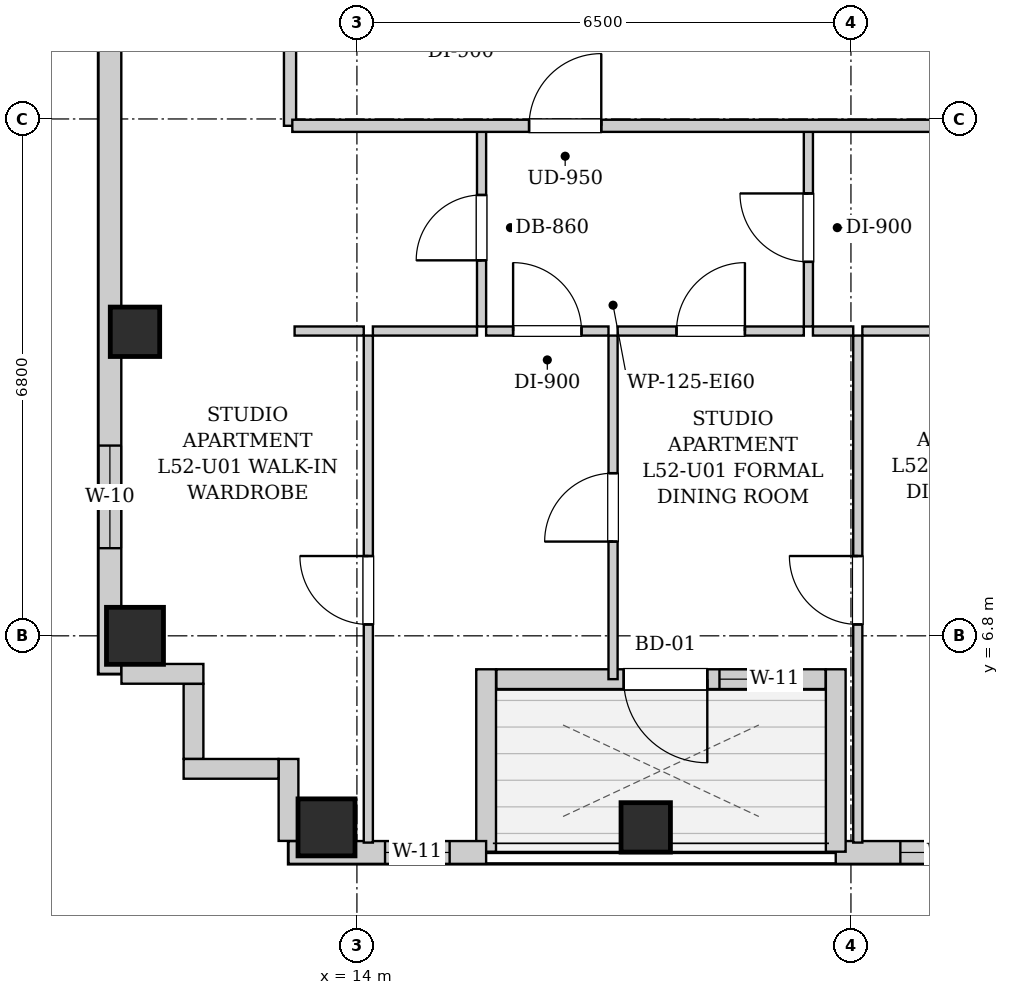
"""IFC4 building model, lengths in metres.
Left out: names, types, materials, properties, quantities, classifications, styles, units other than length and angle.
Written with IfcOpenShell. Run it as: python <this file> out.ifc"""

import sys

from ifc_helpers import new_model, si_unit, direction, frame, frame_2d, origin, origin_2d, place, context, subcontext, project, spatial, rectangle, extrude, element, fill, save


model = new_model("IFC4")
c1 = context("Model", 3, precision=1e-05, world=origin(), true_north=direction((0.0, 1.0)))
c2 = subcontext(c1, "Body", "Model", "MODEL_VIEW")
j1 = project(units=[si_unit("LENGTHUNIT", "METRE"), si_unit("PLANEANGLEUNIT", "RADIAN")], contexts=[c1])
p1 = place(None, origin())
s1 = spatial("IfcSite", under=j1, at=p1, CompositionType="ELEMENT")
p2 = place(p1, origin())
s2 = spatial("IfcBuilding", under=s1, at=p2, CompositionType="ELEMENT")
p3 = place(p2, frame((0.0, 0.0, 181.0)))
s3 = spatial("IfcBuildingStorey", under=s2, at=p3, CompositionType="ELEMENT", Elevation=181.0)
p4 = place(p3, frame((13.6, 4.28, 0.0), z_axis=(0.0, 0.0, 1.0), x_axis=(1.0, 0.0, 0.0)))
e1 = element("IfcColumn", 1, at=p4, inside=s3, PredefinedType="COLUMN", context=c2, shape_type="SweptSolid", body=[
    extrude(rectangle(XDim=0.75, YDim=0.75, at=origin_2d()), origin(), (0.0, 0.0, 1.0), 3.3),
])
p5 = place(p3, frame((17.8, 4.28, 0.0), z_axis=(0.0, 0.0, 1.0), x_axis=(1.0, 0.0, 0.0)))
e2 = element("IfcColumn", 2, at=p5, inside=s3, PredefinedType="COLUMN", context=c2, shape_type="SweptSolid", body=[
    extrude(rectangle(XDim=0.65, YDim=0.65, at=origin_2d()), origin(), (0.0, 0.0, 1.0), 3.3),
])
p6 = place(p3, frame((11.08, 6.8, 0.0), z_axis=(0.0, 0.0, 1.0), x_axis=(1.0, 0.0, 0.0)))
e3 = element("IfcColumn", 3, at=p6, inside=s3, PredefinedType="COLUMN", context=c2, shape_type="SweptSolid", body=[
    extrude(rectangle(XDim=0.75, YDim=0.75, at=origin_2d()), origin(), (0.0, 0.0, 1.0), 3.3),
])
p7 = place(p3, frame((11.08, 10.8, 0.0), z_axis=(0.0, 0.0, 1.0), x_axis=(1.0, 0.0, 0.0)))
e4 = element("IfcColumn", 4, at=p7, inside=s3, PredefinedType="COLUMN", context=c2, shape_type="SweptSolid", body=[
    extrude(rectangle(XDim=0.65, YDim=0.65, at=origin_2d()), origin(), (0.0, 0.0, 1.0), 3.3),
])
p8 = place(p3, frame((31.5, 3.95, 0.0), z_axis=(0.0, 0.0, 1.0), x_axis=(-1.0, 0.0, 0.0)))
e5 = element("IfcWall", 5, at=p8, inside=s3, PredefinedType="SOLIDWALL", context=c2, shape_type="SweptSolid", body=[
    extrude(rectangle(XDim=11.2, YDim=0.3, at=frame_2d((5.6, 0.0))), origin(), (0.0, 0.0, 1.0), 3.04),
])
p9 = place(p8, frame((9.0, 0.0, 0.55)))
e6 = element("IfcOpeningElement", 6, at=p9, cuts=e5, PredefinedType="OPENING", context=c2, shape_type="SweptSolid", body=[
    extrude(rectangle(XDim=1.35, YDim=1.2, at=frame_2d((0.675, 0.6))), frame((0.0, 0.16, 0.0), z_axis=(0.0, -1.0, 0.0), x_axis=(1.0, 0.0, 0.0)), (0.0, 0.0, 1.0), 0.32),
])
p10 = place(p8, frame((2.201, 0.0, 0.55)))
e7 = element("IfcOpeningElement", 7, at=p10, cuts=e5, PredefinedType="OPENING", context=c2, shape_type="SweptSolid", body=[
    extrude(rectangle(XDim=1.35, YDim=1.2, at=frame_2d((0.675, 0.6))), frame((0.0, 0.16, 0.0), z_axis=(0.0, -1.0, 0.0), x_axis=(1.0, 0.0, 0.0)), (0.0, 0.0, 1.0), 0.32),
])
p11 = place(p8, frame((0.35, 0.0, 0.55)))
e8 = element("IfcOpeningElement", 8, at=p11, cuts=e5, PredefinedType="OPENING", context=c2, shape_type="SweptSolid", body=[
    extrude(rectangle(XDim=0.68, YDim=1.2, at=frame_2d((0.34, 0.6))), frame((0.0, 0.16, 0.0), z_axis=(0.0, -1.0, 0.0), x_axis=(1.0, 0.0, 0.0)), (0.0, 0.0, 1.0), 0.32),
])
p12 = place(p3, frame((20.3, 3.96, 0.0), z_axis=(0.0, 0.0, 1.0), x_axis=(0.0, 1.0, 0.0)))
e9 = element("IfcWall", 9, at=p12, inside=s3, PredefinedType="SOLIDWALL", context=c2, shape_type="SweptSolid", body=[
    extrude(rectangle(XDim=2.4, YDim=0.26, at=frame_2d((1.2, 0.0))), origin(), (0.0, 0.0, 1.0), 3.04),
])
p13 = place(p3, frame((20.166, 6.23, 0.0), z_axis=(0.0, 0.0, 1.0), x_axis=(-1.0, 0.0, 0.0)))
e10 = element("IfcWall", 10, at=p13, inside=s3, PredefinedType="SOLIDWALL", context=c2, shape_type="SweptSolid", body=[
    extrude(rectangle(XDim=4.332, YDim=0.26, at=frame_2d((2.166, 0.0))), origin(), (0.0, 0.0, 1.0), 3.04),
])
p14 = place(p13, frame((1.556, 0.0, 0.0)))
e11 = element("IfcOpeningElement", 11, at=p14, cuts=e10, PredefinedType="OPENING", context=c2, shape_type="SweptSolid", body=[
    extrude(rectangle(XDim=1.1, YDim=2.0, at=frame_2d((0.55, 1.0))), frame((0.0, 0.14, 0.0), z_axis=(0.0, -1.0, 0.0), x_axis=(1.0, 0.0, 0.0)), (0.0, 0.0, 1.0), 0.28),
])
p15 = place(p13, frame((0.546, 0.0, 0.55)))
e12 = element("IfcOpeningElement", 12, at=p15, cuts=e10, PredefinedType="OPENING", context=c2, shape_type="SweptSolid", body=[
    extrude(rectangle(XDim=0.85, YDim=1.2, at=frame_2d((0.425, 0.6))), frame((0.0, 0.14, 0.0), z_axis=(0.0, -1.0, 0.0), x_axis=(1.0, 0.0, 0.0)), (0.0, 0.0, 1.0), 0.28),
])
p16 = place(p3, frame((15.7, 6.36, 0.0), z_axis=(0.0, 0.0, 1.0), x_axis=(0.0, -1.0, 0.0)))
e13 = element("IfcWall", 13, at=p16, inside=s3, PredefinedType="SOLIDWALL", context=c2, shape_type="SweptSolid", body=[
    extrude(rectangle(XDim=2.4, YDim=0.26, at=frame_2d((1.2, 0.0))), origin(), (0.0, 0.0, 1.0), 3.04),
])
p17 = place(p3, frame((15.7, 3.95, 0.0), z_axis=(0.0, 0.0, 1.0), x_axis=(-1.0, 0.0, 0.0)))
e14 = element("IfcWall", 14, at=p17, inside=s3, PredefinedType="SOLIDWALL", context=c2, shape_type="SweptSolid", body=[
    extrude(rectangle(XDim=2.6, YDim=0.3, at=frame_2d((1.3, 0.0))), origin(), (0.0, 0.0, 1.0), 3.04),
])
p18 = place(p17, frame((0.48, 0.0, 0.55)))
e15 = element("IfcOpeningElement", 15, at=p18, cuts=e14, PredefinedType="OPENING", context=c2, shape_type="SweptSolid", body=[
    extrude(rectangle(XDim=0.85, YDim=1.2, at=frame_2d((0.425, 0.6))), frame((0.0, 0.16, 0.0), z_axis=(0.0, -1.0, 0.0), x_axis=(1.0, 0.0, 0.0)), (0.0, 0.0, 1.0), 0.32),
])
p19 = place(p3, frame((10.75, 6.3, 0.0), z_axis=(0.0, 0.0, 1.0), x_axis=(0.0, 1.0, 0.0)))
e16 = element("IfcWall", 16, at=p19, inside=s3, PredefinedType="SOLIDWALL", context=c2, shape_type="SweptSolid", body=[
    extrude(rectangle(XDim=31.4, YDim=0.3, at=frame_2d((15.7, 0.0))), origin(), (0.0, 0.0, 1.0), 3.04),
])
p20 = place(p19, frame((1.653, 0.0, 0.55)))
e17 = element("IfcOpeningElement", 17, at=p20, cuts=e16, PredefinedType="OPENING", context=c2, shape_type="SweptSolid", body=[
    extrude(rectangle(XDim=1.35, YDim=1.2, at=frame_2d((0.675, 0.6))), frame((0.0, 0.16, 0.0), z_axis=(0.0, -1.0, 0.0), x_axis=(1.0, 0.0, 0.0)), (0.0, 0.0, 1.0), 0.32),
])
p21 = place(p19, frame((11.85, 0.0, 0.55)))
e18 = element("IfcOpeningElement", 18, at=p21, cuts=e16, PredefinedType="OPENING", context=c2, shape_type="SweptSolid", body=[
    extrude(rectangle(XDim=1.35, YDim=1.2, at=frame_2d((0.675, 0.6))), frame((0.0, 0.16, 0.0), z_axis=(0.0, -1.0, 0.0), x_axis=(1.0, 0.0, 0.0)), (0.0, 0.0, 1.0), 0.32),
])
p22 = place(p19, frame((9.185, 0.0, 0.55)))
e19 = element("IfcOpeningElement", 19, at=p22, cuts=e16, PredefinedType="OPENING", context=c2, shape_type="SweptSolid", body=[
    extrude(rectangle(XDim=1.35, YDim=1.2, at=frame_2d((0.675, 0.6))), frame((0.0, 0.16, 0.0), z_axis=(0.0, -1.0, 0.0), x_axis=(1.0, 0.0, 0.0)), (0.0, 0.0, 1.0), 0.32),
])
p23 = place(p19, frame((21.209, 0.0, 0.55)))
e20 = element("IfcOpeningElement", 20, at=p23, cuts=e16, PredefinedType="OPENING", context=c2, shape_type="SweptSolid", body=[
    extrude(rectangle(XDim=0.85, YDim=1.2, at=frame_2d((0.425, 0.6))), frame((0.0, 0.16, 0.0), z_axis=(0.0, -1.0, 0.0), x_axis=(1.0, 0.0, 0.0)), (0.0, 0.0, 1.0), 0.32),
])
p24 = place(p3, frame((13.1, 4.102, 0.0), z_axis=(0.0, 0.0, 1.0), x_axis=(0.0, 1.0, 0.0)))
e21 = element("IfcWall", 21, at=p24, inside=s3, PredefinedType="SOLIDWALL", context=c2, shape_type="SweptSolid", body=[
    extrude(rectangle(XDim=1.078, YDim=0.26, at=frame_2d((0.539, 0.0))), origin(), (0.0, 0.0, 1.0), 3.04),
])
p25 = place(p3, frame((12.968, 5.05, 0.0), z_axis=(0.0, 0.0, 1.0), x_axis=(-1.0, 0.0, 0.0)))
e22 = element("IfcWall", 22, at=p25, inside=s3, PredefinedType="SOLIDWALL", context=c2, shape_type="SweptSolid", body=[
    extrude(rectangle(XDim=1.248, YDim=0.26, at=frame_2d((0.624, 0.0))), origin(), (0.0, 0.0, 1.0), 3.04),
])
p26 = place(p3, frame((11.85, 5.182, 0.0), z_axis=(0.0, 0.0, 1.0), x_axis=(0.0, 1.0, 0.0)))
e23 = element("IfcWall", 23, at=p26, inside=s3, PredefinedType="SOLIDWALL", context=c2, shape_type="SweptSolid", body=[
    extrude(rectangle(XDim=0.986, YDim=0.26, at=frame_2d((0.493, 0.0))), origin(), (0.0, 0.0, 1.0), 3.04),
])
p27 = place(p3, frame((11.98, 6.3, 0.0), z_axis=(0.0, 0.0, 1.0), x_axis=(-1.0, 0.0, 0.0)))
e24 = element("IfcWall", 24, at=p27, inside=s3, PredefinedType="SOLIDWALL", context=c2, shape_type="SweptSolid", body=[
    extrude(rectangle(XDim=1.078, YDim=0.26, at=frame_2d((0.539, 0.0))), origin(), (0.0, 0.0, 1.0), 3.04),
])
p28 = place(p3, frame((13.12, 13.51, 0.0), z_axis=(0.0, 0.0, 1.0), x_axis=(0.0, 1.0, 0.0)))
e25 = element("IfcWall", 25, at=p28, inside=s3, PredefinedType="PARTITIONING", context=c2, shape_type="SweptSolid", body=[
    extrude(rectangle(XDim=1.58, YDim=0.16, at=frame_2d((0.79, 0.0))), origin(), (0.0, 0.0, 1.0), 3.04),
])
p29 = place(p3, frame((15.64, 10.87, 0.0), z_axis=(0.0, 0.0, 1.0), x_axis=(0.0, 1.0, 0.0)))
e26 = element("IfcWall", 26, at=p29, inside=s3, PredefinedType="PARTITIONING", context=c2, shape_type="SweptSolid", body=[
    extrude(rectangle(XDim=2.6, YDim=0.12, at=frame_2d((1.3, 0.0))), origin(), (0.0, 0.0, 1.0), 3.04),
])
p30 = place(p29, frame((0.87, 0.0, 0.0)))
e27 = element("IfcOpeningElement", 27, at=p30, cuts=e26, PredefinedType="OPENING", context=c2, shape_type="SweptSolid", body=[
    extrude(rectangle(XDim=0.86, YDim=2.05, at=frame_2d((0.43, 1.025))), frame((0.0, 0.07, 0.0), z_axis=(0.0, -1.0, 0.0), x_axis=(1.0, 0.0, 0.0)), (0.0, 0.0, 1.0), 0.14),
])
p31 = place(p3, frame((13.18, 10.81, 0.0), z_axis=(0.0, 0.0, 1.0), x_axis=(1.0, 0.0, 0.0)))
e28 = element("IfcWall", 28, at=p31, inside=s3, PredefinedType="PARTITIONING", context=c2, shape_type="SweptSolid", body=[
    extrude(rectangle(XDim=0.91, YDim=0.12, at=frame_2d((0.455, 0.0))), origin(), (0.0, 0.0, 1.0), 3.04),
])
p32 = place(p3, frame((14.21, 10.81, 0.0), z_axis=(0.0, 0.0, 1.0), x_axis=(1.0, 0.0, 0.0)))
e29 = element("IfcWall", 29, at=p32, inside=s3, PredefinedType="PARTITIONING", context=c2, shape_type="SweptSolid", body=[
    extrude(rectangle(XDim=1.37, YDim=0.12, at=frame_2d((0.685, 0.0))), origin(), (0.0, 0.0, 1.0), 3.04),
])
p33 = place(p3, frame((19.94, 10.87, 0.0), z_axis=(0.0, 0.0, 1.0), x_axis=(0.0, 1.0, 0.0)))
e30 = element("IfcWall", 30, at=p33, inside=s3, PredefinedType="PARTITIONING", context=c2, shape_type="SweptSolid", body=[
    extrude(rectangle(XDim=2.6, YDim=0.12, at=frame_2d((1.3, 0.0))), origin(), (0.0, 0.0, 1.0), 3.04),
])
p34 = place(p33, frame((0.85, 0.0, 0.0)))
e31 = element("IfcOpeningElement", 31, at=p34, cuts=e30, PredefinedType="OPENING", context=c2, shape_type="SweptSolid", body=[
    extrude(rectangle(XDim=0.9, YDim=2.05, at=frame_2d((0.45, 1.025))), frame((0.0, 0.07, 0.0), z_axis=(0.0, -1.0, 0.0), x_axis=(1.0, 0.0, 0.0)), (0.0, 0.0, 1.0), 0.14),
])
p35 = place(p3, frame((15.7, 10.81, 0.0), z_axis=(0.0, 0.0, 1.0), x_axis=(1.0, 0.0, 0.0)))
e32 = element("IfcWall", 32, at=p35, inside=s3, PredefinedType="PARTITIONING", context=c2, shape_type="SweptSolid", body=[
    extrude(rectangle(XDim=1.61, YDim=0.12, at=frame_2d((0.805, 0.0))), origin(), (0.0, 0.0, 1.0), 3.04),
])
p36 = place(p35, frame((0.355, 0.0, 0.0)))
e33 = element("IfcOpeningElement", 33, at=p36, cuts=e32, PredefinedType="OPENING", context=c2, shape_type="SweptSolid", body=[
    extrude(rectangle(XDim=0.9, YDim=2.05, at=frame_2d((0.45, 1.025))), frame((0.0, 0.07, 0.0), z_axis=(0.0, -1.0, 0.0), x_axis=(1.0, 0.0, 0.0)), (0.0, 0.0, 1.0), 0.14),
])
p37 = place(p3, frame((17.43, 10.81, 0.0), z_axis=(0.0, 0.0, 1.0), x_axis=(1.0, 0.0, 0.0)))
e34 = element("IfcWall", 34, at=p37, inside=s3, PredefinedType="PARTITIONING", context=c2, shape_type="SweptSolid", body=[
    extrude(rectangle(XDim=2.45, YDim=0.12, at=frame_2d((1.225, 0.0))), origin(), (0.0, 0.0, 1.0), 3.04),
])
p38 = place(p37, frame((0.775, 0.0, 0.0)))
e35 = element("IfcOpeningElement", 35, at=p38, cuts=e34, PredefinedType="OPENING", context=c2, shape_type="SweptSolid", body=[
    extrude(rectangle(XDim=0.9, YDim=2.05, at=frame_2d((0.45, 1.025))), frame((0.0, 0.07, 0.0), z_axis=(0.0, -1.0, 0.0), x_axis=(1.0, 0.0, 0.0)), (0.0, 0.0, 1.0), 0.14),
])
p39 = place(p3, frame((20.0, 10.81, 0.0), z_axis=(0.0, 0.0, 1.0), x_axis=(1.0, 0.0, 0.0)))
e36 = element("IfcWall", 36, at=p39, inside=s3, PredefinedType="PARTITIONING", context=c2, shape_type="SweptSolid", body=[
    extrude(rectangle(XDim=0.53, YDim=0.12, at=frame_2d((0.265, 0.0))), origin(), (0.0, 0.0, 1.0), 3.04),
])
p40 = place(p3, frame((20.65, 10.81, 0.0), z_axis=(0.0, 0.0, 1.0), x_axis=(1.0, 0.0, 0.0)))
e37 = element("IfcWall", 37, at=p40, inside=s3, PredefinedType="PARTITIONING", context=c2, shape_type="SweptSolid", body=[
    extrude(rectangle(XDim=2.735, YDim=0.12, at=frame_2d((1.368, 0.0))), origin(), (0.0, 0.0, 1.0), 3.04),
])
p41 = place(p40, frame((0.918, 0.0, 0.0)))
e38 = element("IfcOpeningElement", 38, at=p41, cuts=e37, PredefinedType="OPENING", context=c2, shape_type="SweptSolid", body=[
    extrude(rectangle(XDim=0.9, YDim=2.05, at=frame_2d((0.45, 1.025))), frame((0.0, 0.07, 0.0), z_axis=(0.0, -1.0, 0.0), x_axis=(1.0, 0.0, 0.0)), (0.0, 0.0, 1.0), 0.14),
])
p42 = place(p3, frame((14.15, 4.08, 0.0), z_axis=(0.0, 0.0, 1.0), x_axis=(0.0, 1.0, 0.0)))
e39 = element("IfcWall", 39, at=p42, inside=s3, PredefinedType="PARTITIONING", context=c2, shape_type="SweptSolid", body=[
    extrude(rectangle(XDim=6.67, YDim=0.12, at=frame_2d((3.335, 0.0))), origin(), (0.0, 0.0, 1.0), 3.04),
])
p43 = place(p42, frame((2.87, 0.0, 0.0)))
e40 = element("IfcOpeningElement", 40, at=p43, cuts=e39, PredefinedType="OPENING", context=c2, shape_type="SweptSolid", body=[
    extrude(rectangle(XDim=0.9, YDim=2.05, at=frame_2d((0.45, 1.025))), frame((0.0, 0.07, 0.0), z_axis=(0.0, -1.0, 0.0), x_axis=(1.0, 0.0, 0.0)), (0.0, 0.0, 1.0), 0.14),
])
p44 = place(p3, frame((17.37, 6.23, 0.0), z_axis=(0.0, 0.0, 1.0), x_axis=(0.0, 1.0, 0.0)))
e41 = element("IfcWall", 41, at=p44, inside=s3, PredefinedType="PARTITIONING", context=c2, shape_type="SweptSolid", body=[
    extrude(rectangle(XDim=4.52, YDim=0.12, at=frame_2d((2.26, 0.0))), origin(), (0.0, 0.0, 1.0), 3.04),
])
p45 = place(p44, frame((1.81, 0.0, 0.0)))
e42 = element("IfcOpeningElement", 42, at=p45, cuts=e41, PredefinedType="OPENING", context=c2, shape_type="SweptSolid", body=[
    extrude(rectangle(XDim=0.9, YDim=2.05, at=frame_2d((0.45, 1.025))), frame((0.0, 0.07, 0.0), z_axis=(0.0, -1.0, 0.0), x_axis=(1.0, 0.0, 0.0)), (0.0, 0.0, 1.0), 0.14),
])
p46 = place(p3, frame((20.59, 4.08, 0.0), z_axis=(0.0, 0.0, 1.0), x_axis=(0.0, 1.0, 0.0)))
e43 = element("IfcWall", 43, at=p46, inside=s3, PredefinedType="PARTITIONING", context=c2, shape_type="SweptSolid", body=[
    extrude(rectangle(XDim=6.67, YDim=0.12, at=frame_2d((3.335, 0.0))), origin(), (0.0, 0.0, 1.0), 3.04),
])
p47 = place(p46, frame((2.87, 0.0, 0.0)))
e44 = element("IfcOpeningElement", 44, at=p47, cuts=e43, PredefinedType="OPENING", context=c2, shape_type="SweptSolid", body=[
    extrude(rectangle(XDim=0.9, YDim=2.05, at=frame_2d((0.45, 1.025))), frame((0.0, 0.07, 0.0), z_axis=(0.0, -1.0, 0.0), x_axis=(1.0, 0.0, 0.0)), (0.0, 0.0, 1.0), 0.14),
])
p48 = place(p3, frame((13.15, 13.51, 0.0), z_axis=(0.0, 0.0, 1.0), x_axis=(1.0, 0.0, 0.0)))
e45 = element("IfcWall", 45, at=p48, inside=s3, PredefinedType="PARTITIONING", context=c2, shape_type="SweptSolid", body=[
    extrude(rectangle(XDim=24.6, YDim=0.16, at=frame_2d((12.3, 0.0))), origin(), (0.0, 0.0, 1.0), 3.04),
])
p49 = place(p48, frame((3.115, 0.0, 0.0)))
e46 = element("IfcOpeningElement", 46, at=p49, cuts=e45, PredefinedType="OPENING", context=c2, shape_type="SweptSolid", body=[
    extrude(rectangle(XDim=0.95, YDim=2.1, at=frame_2d((0.475, 1.05))), frame((0.0, 0.09, 0.0), z_axis=(0.0, -1.0, 0.0), x_axis=(1.0, 0.0, 0.0)), (0.0, 0.0, 1.0), 0.18),
])
p50 = place(p30, origin())
e47 = element("IfcDoor", 47, at=p50, inside=s3, OperationType="SINGLE_SWING_LEFT", PredefinedType="DOOR", context=c2, shape_type="SweptSolid", body=[
    extrude(rectangle(XDim=0.86, YDim=2.05, at=frame_2d((0.43, 1.025))), frame((0.0, 0.025, 0.0), z_axis=(0.0, -1.0, 0.0), x_axis=(1.0, 0.0, 0.0)), (0.0, 0.0, 1.0), 0.05),
])
fill(e27, e47)
p51 = place(p34, origin())
e48 = element("IfcDoor", 48, at=p51, inside=s3, OperationType="SINGLE_SWING_RIGHT", PredefinedType="DOOR", context=c2, shape_type="SweptSolid", body=[
    extrude(rectangle(XDim=0.9, YDim=2.05, at=frame_2d((0.45, 1.025))), frame((0.0, 0.025, 0.0), z_axis=(0.0, -1.0, 0.0), x_axis=(1.0, 0.0, 0.0)), (0.0, 0.0, 1.0), 0.05),
])
fill(e31, e48)
p52 = place(p36, origin())
e49 = element("IfcDoor", 49, at=p52, inside=s3, OperationType="SINGLE_SWING_LEFT", PredefinedType="DOOR", context=c2, shape_type="SweptSolid", body=[
    extrude(rectangle(XDim=0.9, YDim=2.05, at=frame_2d((0.45, 1.025))), frame((0.0, 0.025, 0.0), z_axis=(0.0, -1.0, 0.0), x_axis=(1.0, 0.0, 0.0)), (0.0, 0.0, 1.0), 0.05),
])
fill(e33, e49)
p53 = place(p38, origin())
e50 = element("IfcDoor", 50, at=p53, inside=s3, OperationType="SINGLE_SWING_RIGHT", PredefinedType="DOOR", context=c2, shape_type="SweptSolid", body=[
    extrude(rectangle(XDim=0.9, YDim=2.05, at=frame_2d((0.45, 1.025))), frame((0.0, 0.025, 0.0), z_axis=(0.0, -1.0, 0.0), x_axis=(1.0, 0.0, 0.0)), (0.0, 0.0, 1.0), 0.05),
])
fill(e35, e50)
p54 = place(p43, origin())
e51 = element("IfcDoor", 51, at=p54, inside=s3, OperationType="SINGLE_SWING_RIGHT", PredefinedType="DOOR", context=c2, shape_type="SweptSolid", body=[
    extrude(rectangle(XDim=0.9, YDim=2.05, at=frame_2d((0.45, 1.025))), frame((0.0, 0.025, 0.0), z_axis=(0.0, -1.0, 0.0), x_axis=(1.0, 0.0, 0.0)), (0.0, 0.0, 1.0), 0.05),
])
fill(e40, e51)
p55 = place(p45, origin())
e52 = element("IfcDoor", 52, at=p55, inside=s3, OperationType="SINGLE_SWING_LEFT", PredefinedType="DOOR", context=c2, shape_type="SweptSolid", body=[
    extrude(rectangle(XDim=0.9, YDim=2.05, at=frame_2d((0.45, 1.025))), frame((0.0, 0.025, 0.0), z_axis=(0.0, -1.0, 0.0), x_axis=(1.0, 0.0, 0.0)), (0.0, 0.0, 1.0), 0.05),
])
fill(e42, e52)
p56 = place(p47, origin())
e53 = element("IfcDoor", 53, at=p56, inside=s3, OperationType="SINGLE_SWING_RIGHT", PredefinedType="DOOR", context=c2, shape_type="SweptSolid", body=[
    extrude(rectangle(XDim=0.9, YDim=2.05, at=frame_2d((0.45, 1.025))), frame((0.0, 0.025, 0.0), z_axis=(0.0, -1.0, 0.0), x_axis=(1.0, 0.0, 0.0)), (0.0, 0.0, 1.0), 0.05),
])
fill(e44, e53)
p57 = place(p49, origin())
e54 = element("IfcDoor", 54, at=p57, inside=s3, OperationType="SINGLE_SWING_RIGHT", PredefinedType="DOOR", context=c2, shape_type="SweptSolid", body=[
    extrude(rectangle(XDim=0.95, YDim=2.1, at=frame_2d((0.475, 1.05))), frame((0.0, 0.025, 0.0), z_axis=(0.0, -1.0, 0.0), x_axis=(1.0, 0.0, 0.0)), (0.0, 0.0, 1.0), 0.05),
])
fill(e46, e54)
p58 = place(p14, origin())
e55 = element("IfcDoor", 55, at=p58, inside=s3, OperationType="SINGLE_SWING_LEFT", PredefinedType="DOOR", context=c2, shape_type="SweptSolid", body=[
    extrude(rectangle(XDim=1.1, YDim=2.0, at=frame_2d((0.55, 1.0))), frame((0.0, 0.025, 0.0), z_axis=(0.0, -1.0, 0.0), x_axis=(1.0, 0.0, 0.0)), (0.0, 0.0, 1.0), 0.05),
])
fill(e11, e55)
p59 = place(p20, origin())
e56 = element("IfcWindow", 56, at=p59, inside=s3, PartitioningType="SINGLE_PANEL", PredefinedType="WINDOW", context=c2, shape_type="SweptSolid", body=[
    extrude(rectangle(XDim=1.35, YDim=1.2, at=frame_2d((0.675, 0.6))), frame((0.0, 0.03, 0.0), z_axis=(0.0, -1.0, 0.0), x_axis=(1.0, 0.0, 0.0)), (0.0, 0.0, 1.0), 0.06),
])
fill(e17, e56)
p60 = place(p18, origin())
e57 = element("IfcWindow", 57, at=p60, inside=s3, PartitioningType="SINGLE_PANEL", PredefinedType="WINDOW", context=c2, shape_type="SweptSolid", body=[
    extrude(rectangle(XDim=0.85, YDim=1.2, at=frame_2d((0.425, 0.6))), frame((0.0, 0.03, 0.0), z_axis=(0.0, -1.0, 0.0), x_axis=(1.0, 0.0, 0.0)), (0.0, 0.0, 1.0), 0.06),
])
fill(e15, e57)
p61 = place(p15, origin())
e58 = element("IfcWindow", 58, at=p61, inside=s3, PartitioningType="SINGLE_PANEL", PredefinedType="WINDOW", context=c2, shape_type="SweptSolid", body=[
    extrude(rectangle(XDim=0.85, YDim=1.2, at=frame_2d((0.425, 0.6))), frame((0.0, 0.03, 0.0), z_axis=(0.0, -1.0, 0.0), x_axis=(1.0, 0.0, 0.0)), (0.0, 0.0, 1.0), 0.06),
])
fill(e12, e58)
p62 = place(p9, origin())
e59 = element("IfcWindow", 59, at=p62, inside=s3, PartitioningType="SINGLE_PANEL", PredefinedType="WINDOW", context=c2, shape_type="SweptSolid", body=[
    extrude(rectangle(XDim=1.35, YDim=1.2, at=frame_2d((0.675, 0.6))), frame((0.0, 0.03, 0.0), z_axis=(0.0, -1.0, 0.0), x_axis=(1.0, 0.0, 0.0)), (0.0, 0.0, 1.0), 0.06),
])
fill(e6, e59)
save(model, sys.argv[1])
